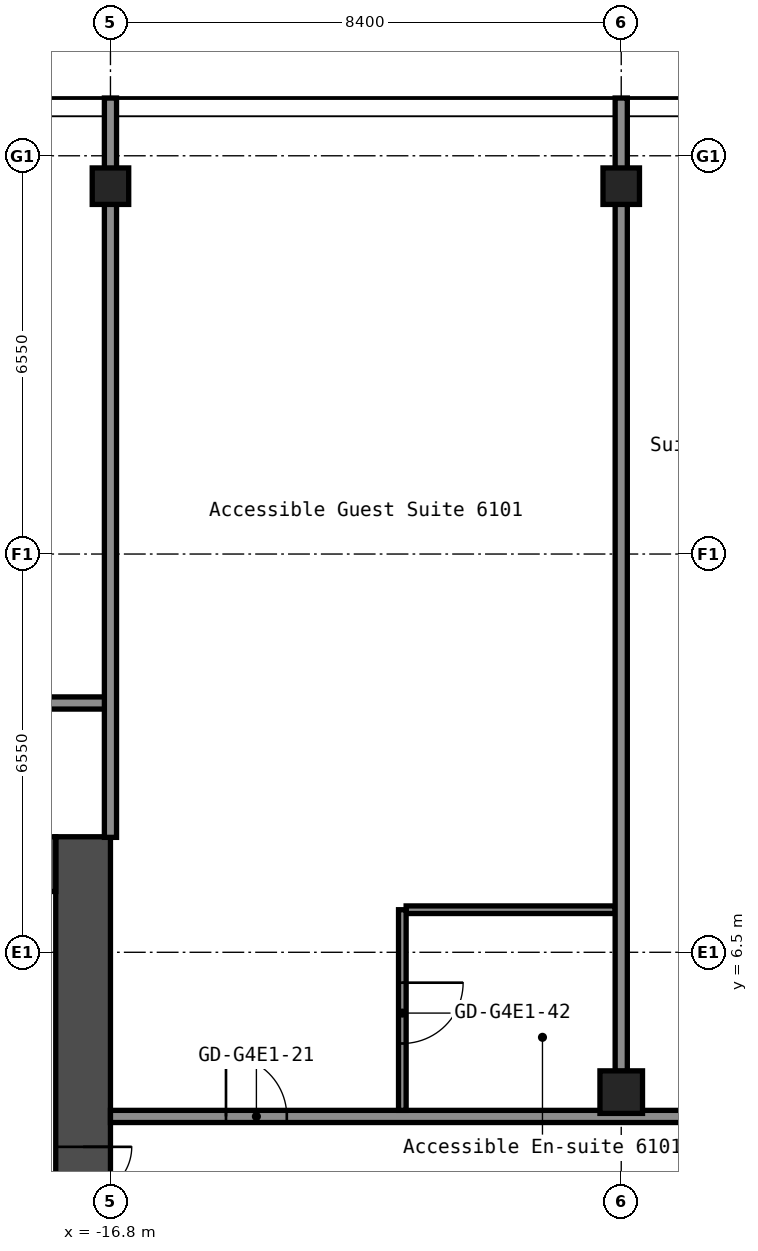
"""IFC4 building model, lengths in metres.
Left out: names, types, materials, properties, quantities, classifications, styles, units other than length and angle.
Written with IfcOpenShell. Run it as: python <this file> out.ifc"""

import sys

from ifc_helpers import new_model, si_unit, direction, frame, frame_2d, origin, origin_2d, place, context, subcontext, project, spatial, rectangle, hollow_rectangle, extrude, element, fill, save


model = new_model("IFC4")
c1 = context("Model", 3, precision=1e-05, world=origin(), true_north=direction((0.0, 1.0)))
c2 = subcontext(c1, "Body", "Model", "MODEL_VIEW")
j1 = project(units=[si_unit("LENGTHUNIT", "METRE"), si_unit("PLANEANGLEUNIT", "RADIAN")], contexts=[c1])
p1 = place(None, origin())
s1 = spatial("IfcSite", under=j1, at=p1, CompositionType="ELEMENT")
p2 = place(p1, origin())
s2 = spatial("IfcBuilding", under=s1, at=p2, CompositionType="ELEMENT")
p3 = place(p2, frame((0.0, 0.0, 215.4)))
s3 = spatial("IfcBuildingStorey", under=s2, at=p3, CompositionType="ELEMENT", Elevation=215.4)
p4 = place(p3, frame((-16.8, 19.1, 0.0), z_axis=(0.0, 0.0, 1.0), x_axis=(1.0, 0.0, 0.0)))
e1 = element("IfcColumn", 1, at=p4, inside=s3, PredefinedType="COLUMN", context=c2, shape_type="SweptSolid", body=[
    extrude(hollow_rectangle(XDim=0.6, YDim=0.6, WallThickness=0.025, InnerFilletRadius=0.038, OuterFilletRadius=0.062, at=origin_2d()), origin(), (0.0, 0.0, 1.0), 2.75),
])
p5 = place(p3, frame((-8.4, 4.2, 0.0), z_axis=(0.0, 0.0, 1.0), x_axis=(1.0, 0.0, 0.0)))
e2 = element("IfcColumn", 2, at=p5, inside=s3, PredefinedType="COLUMN", context=c2, shape_type="SweptSolid", body=[
    extrude(hollow_rectangle(XDim=0.7, YDim=0.7, WallThickness=0.028, at=origin_2d()), origin(), (0.0, 0.0, 1.0), 2.75),
])
p6 = place(p3, frame((-8.4, 19.1, 0.0), z_axis=(0.0, 0.0, 1.0), x_axis=(1.0, 0.0, 0.0)))
e3 = element("IfcColumn", 3, at=p6, inside=s3, PredefinedType="COLUMN", context=c2, shape_type="SweptSolid", body=[
    extrude(hollow_rectangle(XDim=0.6, YDim=0.6, WallThickness=0.025, InnerFilletRadius=0.038, OuterFilletRadius=0.062, at=origin_2d()), origin(), (0.0, 0.0, 1.0), 2.75),
])
p7 = place(p3, frame((-17.25, -8.4, 0.0), z_axis=(0.0, 0.0, 1.0), x_axis=(0.0, 1.0, 0.0)))
e4 = element("IfcWall", 4, at=p7, inside=s3, PredefinedType="SHEAR", context=c2, shape_type="SweptSolid", body=[
    extrude(rectangle(XDim=16.8, YDim=0.9, at=frame_2d((8.4, 0.0))), origin(), (0.0, 0.0, 1.0), 2.75),
])
p8 = place(p7, frame((10.1, 0.0, 0.0)))
e5 = element("IfcOpeningElement", 5, at=p8, cuts=e4, PredefinedType="OPENING", context=c2, shape_type="SweptSolid", body=[
    extrude(rectangle(XDim=1.6, YDim=2.1, at=frame_2d((0.8, 1.05))), frame((0.0, 0.46, 0.0), z_axis=(0.0, -1.0, 0.0), x_axis=(1.0, 0.0, 0.0)), (0.0, 0.0, 1.0), 0.92),
])
p9 = place(p3, frame((-32.7, 7.95, 0.0), z_axis=(0.0, 0.0, 1.0), x_axis=(1.0, 0.0, 0.0)))
e6 = element("IfcWall", 6, at=p9, inside=s3, PredefinedType="SHEAR", context=c2, shape_type="SweptSolid", body=[
    extrude(rectangle(XDim=15.0, YDim=0.9, at=frame_2d((7.5, 0.0))), origin(), (0.0, 0.0, 1.0), 2.75),
])
p10 = place(p9, frame((3.4, 0.0, 0.0)))
e7 = element("IfcOpeningElement", 7, at=p10, cuts=e6, PredefinedType="OPENING", context=c2, shape_type="SweptSolid", body=[
    extrude(rectangle(XDim=1.2, YDim=2.1, at=frame_2d((0.6, 1.05))), frame((0.0, 0.46, 0.0), z_axis=(0.0, -1.0, 0.0), x_axis=(1.0, 0.0, 0.0)), (0.0, 0.0, 1.0), 0.92),
])
p11 = place(p9, frame((0.75, 0.0, 0.0)))
e8 = element("IfcOpeningElement", 8, at=p11, cuts=e6, PredefinedType="OPENING", context=c2, shape_type="SweptSolid", body=[
    extrude(rectangle(XDim=0.9, YDim=2.1, at=frame_2d((0.45, 1.05))), frame((0.0, 0.46, 0.0), z_axis=(0.0, -1.0, 0.0), x_axis=(1.0, 0.0, 0.0)), (0.0, 0.0, 1.0), 0.92),
])
p12 = place(p3, frame((-16.8, 3.8, 0.0), z_axis=(0.0, 0.0, 1.0), x_axis=(1.0, 0.0, 0.0)))
e9 = element("IfcWall", 9, at=p12, inside=s3, PredefinedType="PARTITIONING", context=c2, shape_type="SweptSolid", body=[
    extrude(rectangle(XDim=33.6, YDim=0.2, at=frame_2d((16.8, 0.0))), origin(), (0.0, 0.0, 1.0), 2.75),
])
p13 = place(p12, frame((1.9, 0.0, 0.0)))
e10 = element("IfcOpeningElement", 10, at=p13, cuts=e9, PredefinedType="OPENING", context=c2, shape_type="SweptSolid", body=[
    extrude(rectangle(XDim=1.0, YDim=2.1, at=frame_2d((0.5, 1.05))), frame((0.0, 0.11, 0.0), z_axis=(0.0, -1.0, 0.0), x_axis=(1.0, 0.0, 0.0)), (0.0, 0.0, 1.0), 0.22),
])
p14 = place(p12, frame((10.0, 0.0, 0.0)))
e11 = element("IfcOpeningElement", 11, at=p14, cuts=e9, PredefinedType="OPENING", context=c2, shape_type="SweptSolid", body=[
    extrude(rectangle(XDim=1.0, YDim=2.1, at=frame_2d((0.5, 1.05))), frame((0.0, 0.11, 0.0), z_axis=(0.0, -1.0, 0.0), x_axis=(1.0, 0.0, 0.0)), (0.0, 0.0, 1.0), 0.22),
])
p15 = place(p12, frame((18.4, 0.0, 0.0)))
e12 = element("IfcOpeningElement", 12, at=p15, cuts=e9, PredefinedType="OPENING", context=c2, shape_type="SweptSolid", body=[
    extrude(rectangle(XDim=1.0, YDim=2.1, at=frame_2d((0.5, 1.05))), frame((0.0, 0.11, 0.0), z_axis=(0.0, -1.0, 0.0), x_axis=(1.0, 0.0, 0.0)), (0.0, 0.0, 1.0), 0.22),
])
p16 = place(p12, frame((26.8, 0.0, 0.0)))
e13 = element("IfcOpeningElement", 13, at=p16, cuts=e9, PredefinedType="OPENING", context=c2, shape_type="SweptSolid", body=[
    extrude(rectangle(XDim=1.0, YDim=2.1, at=frame_2d((0.5, 1.05))), frame((0.0, 0.11, 0.0), z_axis=(0.0, -1.0, 0.0), x_axis=(1.0, 0.0, 0.0)), (0.0, 0.0, 1.0), 0.22),
])
p17 = place(p3, frame((-11.938, 7.2, 0.0), z_axis=(0.0, 0.0, 1.0), x_axis=(1.0, 0.0, 0.0)))
e14 = element("IfcWall", 14, at=p17, inside=s3, PredefinedType="PARTITIONING", context=c2, shape_type="SweptSolid", body=[
    extrude(rectangle(XDim=3.438, YDim=0.125, at=frame_2d((1.719, 0.0))), origin(), (0.0, 0.0, 1.0), 2.75),
])
p18 = place(p3, frame((-38.1, 10.6, 0.0), z_axis=(0.0, 0.0, 1.0), x_axis=(1.0, 0.0, 0.0)))
e15 = element("IfcWall", 15, at=p18, inside=s3, PredefinedType="PARTITIONING", context=c2, shape_type="SweptSolid", body=[
    extrude(rectangle(XDim=21.3, YDim=0.2, at=frame_2d((10.65, 0.0))), origin(), (0.0, 0.0, 1.0), 2.75),
])
p19 = place(p18, frame((1.95, 0.0, 0.0)))
e16 = element("IfcOpeningElement", 16, at=p19, cuts=e15, PredefinedType="OPENING", context=c2, shape_type="SweptSolid", body=[
    extrude(rectangle(XDim=0.9, YDim=2.1, at=frame_2d((0.45, 1.05))), frame((0.0, 0.11, 0.0), z_axis=(0.0, -1.0, 0.0), x_axis=(1.0, 0.0, 0.0)), (0.0, 0.0, 1.0), 0.22),
])
p20 = place(p18, frame((5.73, 0.0, 0.0)))
e17 = element("IfcOpeningElement", 17, at=p20, cuts=e15, PredefinedType="OPENING", context=c2, shape_type="SweptSolid", body=[
    extrude(rectangle(XDim=0.9, YDim=2.1, at=frame_2d((0.45, 1.05))), frame((0.0, 0.11, 0.0), z_axis=(0.0, -1.0, 0.0), x_axis=(1.0, 0.0, 0.0)), (0.0, 0.0, 1.0), 0.22),
])
p21 = place(p18, frame((9.93, 0.0, 0.0)))
e18 = element("IfcOpeningElement", 18, at=p21, cuts=e15, PredefinedType="OPENING", context=c2, shape_type="SweptSolid", body=[
    extrude(rectangle(XDim=0.9, YDim=2.1, at=frame_2d((0.45, 1.05))), frame((0.0, 0.11, 0.0), z_axis=(0.0, -1.0, 0.0), x_axis=(1.0, 0.0, 0.0)), (0.0, 0.0, 1.0), 0.22),
])
p22 = place(p18, frame((13.96, 0.0, 0.0)))
e19 = element("IfcOpeningElement", 19, at=p22, cuts=e15, PredefinedType="OPENING", context=c2, shape_type="SweptSolid", body=[
    extrude(rectangle(XDim=0.9, YDim=2.1, at=frame_2d((0.45, 1.05))), frame((0.0, 0.11, 0.0), z_axis=(0.0, -1.0, 0.0), x_axis=(1.0, 0.0, 0.0)), (0.0, 0.0, 1.0), 0.22),
])
p23 = place(p18, frame((18.16, 0.0, 0.0)))
e20 = element("IfcOpeningElement", 20, at=p23, cuts=e15, PredefinedType="OPENING", context=c2, shape_type="SweptSolid", body=[
    extrude(rectangle(XDim=0.9, YDim=2.1, at=frame_2d((0.45, 1.05))), frame((0.0, 0.11, 0.0), z_axis=(0.0, -1.0, 0.0), x_axis=(1.0, 0.0, 0.0)), (0.0, 0.0, 1.0), 0.22),
])
p24 = place(p3, frame((-16.8, 8.39, 0.0), z_axis=(0.0, 0.0, 1.0), x_axis=(0.0, 1.0, 0.0)))
e21 = element("IfcWall", 21, at=p24, inside=s3, PredefinedType="PARTITIONING", context=c2, shape_type="SweptSolid", body=[
    extrude(rectangle(XDim=12.16, YDim=0.2, at=frame_2d((6.08, 0.0))), origin(), (0.0, 0.0, 1.0), 2.75),
])
p25 = place(p3, frame((-12.0, 3.9, 0.0), z_axis=(0.0, 0.0, 1.0), x_axis=(0.0, 1.0, 0.0)))
e22 = element("IfcWall", 22, at=p25, inside=s3, PredefinedType="PARTITIONING", context=c2, shape_type="SweptSolid", body=[
    extrude(rectangle(XDim=3.3, YDim=0.125, at=frame_2d((1.65, 0.0))), origin(), (0.0, 0.0, 1.0), 2.75),
])
p26 = place(p25, frame((1.1, 0.0, 0.0)))
e23 = element("IfcOpeningElement", 23, at=p26, cuts=e22, PredefinedType="OPENING", context=c2, shape_type="SweptSolid", body=[
    extrude(rectangle(XDim=1.0, YDim=2.1, at=frame_2d((0.5, 1.05))), frame((0.0, 0.073, 0.0), z_axis=(0.0, -1.0, 0.0), x_axis=(1.0, 0.0, 0.0)), (0.0, 0.0, 1.0), 0.145),
])
p27 = place(p3, frame((-8.4, 4.54, 0.0), z_axis=(0.0, 0.0, 1.0), x_axis=(0.0, 1.0, 0.0)))
e24 = element("IfcWall", 24, at=p27, inside=s3, PredefinedType="PARTITIONING", context=c2, shape_type="SweptSolid", body=[
    extrude(rectangle(XDim=16.01, YDim=0.2, at=frame_2d((8.005, 0.0))), origin(), (0.0, 0.0, 1.0), 2.75),
])
p28 = place(p8, origin())
e25 = element("IfcDoor", 25, at=p28, inside=s3, OperationType="DOUBLE_DOOR_SINGLE_SWING", PredefinedType="DOOR", context=c2, shape_type="SweptSolid", body=[
    extrude(rectangle(XDim=1.6, YDim=2.1, at=frame_2d((0.8, 1.05))), frame((0.0, 0.025, 0.0), z_axis=(0.0, -1.0, 0.0), x_axis=(1.0, 0.0, 0.0)), (0.0, 0.0, 1.0), 0.05),
])
fill(e5, e25)
p29 = place(p13, origin())
e26 = element("IfcDoor", 26, at=p29, inside=s3, OperationType="SINGLE_SWING_RIGHT", PredefinedType="DOOR", context=c2, shape_type="SweptSolid", body=[
    extrude(rectangle(XDim=1.0, YDim=2.1, at=frame_2d((0.5, 1.05))), frame((0.0, 0.025, 0.0), z_axis=(0.0, -1.0, 0.0), x_axis=(1.0, 0.0, 0.0)), (0.0, 0.0, 1.0), 0.05),
])
fill(e10, e26)
p30 = place(p26, origin())
e27 = element("IfcDoor", 27, at=p30, inside=s3, OperationType="SINGLE_SWING_RIGHT", PredefinedType="DOOR", context=c2, shape_type="SweptSolid", body=[
    extrude(rectangle(XDim=1.0, YDim=2.1, at=frame_2d((0.5, 1.05))), frame((0.0, 0.025, 0.0), z_axis=(0.0, -1.0, 0.0), x_axis=(1.0, 0.0, 0.0)), (0.0, 0.0, 1.0), 0.05),
])
fill(e23, e27)
save(model, sys.argv[1])
